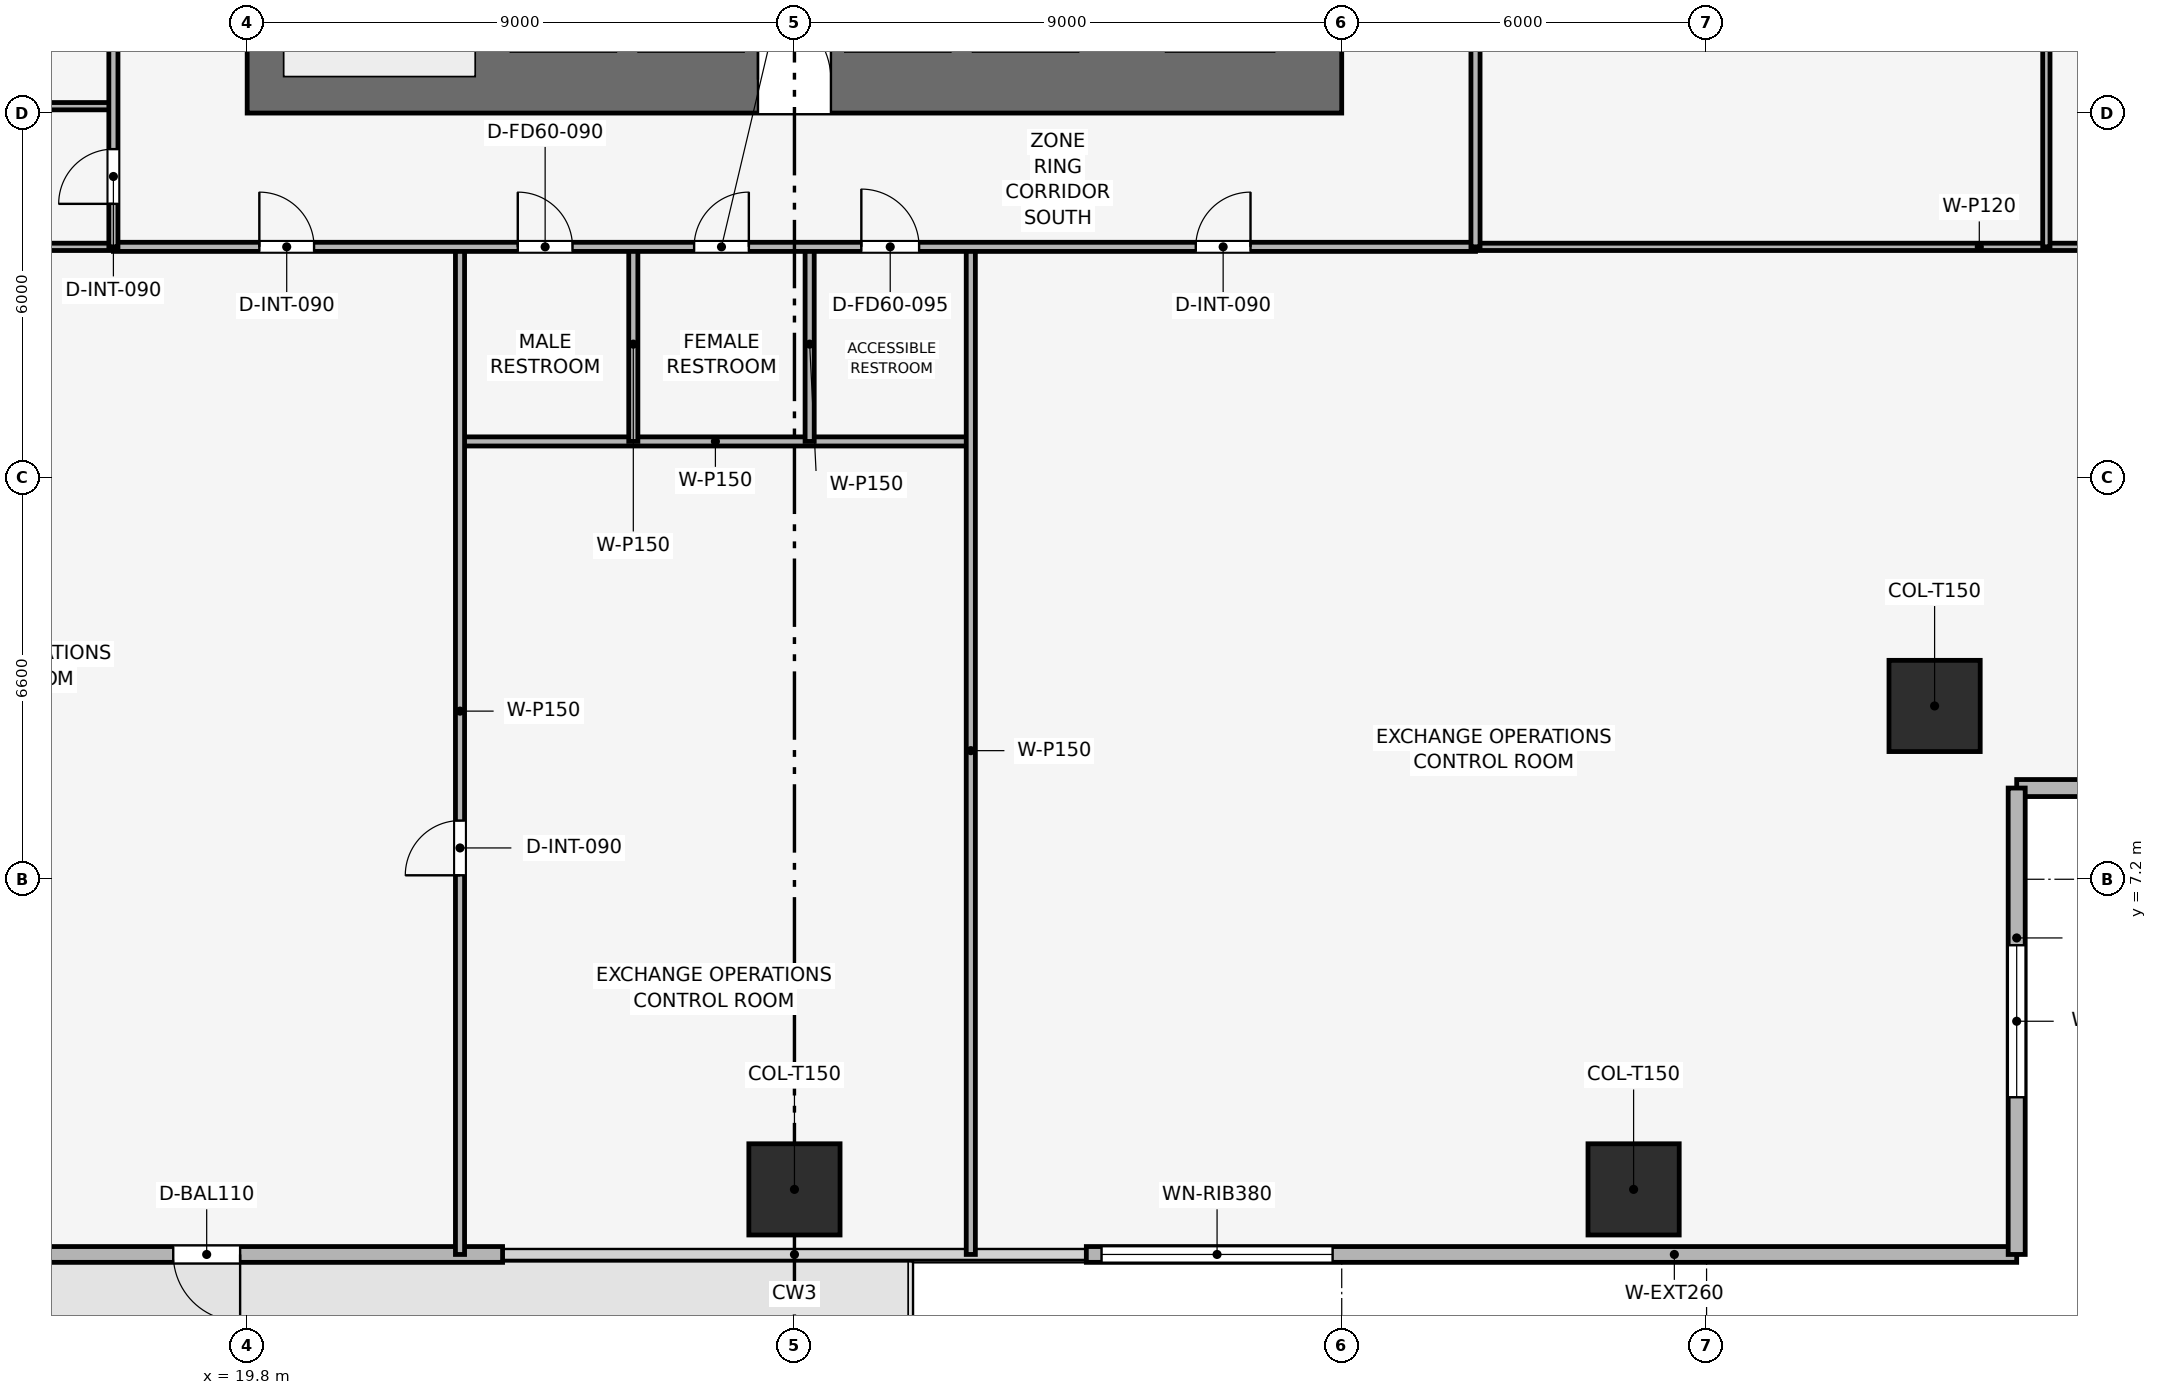
"""IFC4 building model, lengths in metres.
Left out: names, types, materials, properties, quantities, classifications, styles, units other than length and angle.
Written with IfcOpenShell. Run it as: python <this file> out.ifc"""

import sys

from ifc_helpers import new_model, si_unit, direction, frame, frame_2d, origin, origin_2d, place, context, subcontext, project, spatial, rectangle, extrude, element, fill, save


model = new_model("IFC4")
c1 = context("Model", 3, precision=1e-05, world=origin(), true_north=direction((0.0, 1.0)))
c2 = subcontext(c1, "Body", "Model", "MODEL_VIEW")
j1 = project(units=[si_unit("LENGTHUNIT", "METRE"), si_unit("PLANEANGLEUNIT", "RADIAN")], contexts=[c1])
p1 = place(None, origin())
s1 = spatial("IfcSite", under=j1, at=p1, CompositionType="ELEMENT")
p2 = place(p1, origin())
s2 = spatial("IfcBuilding", under=s1, at=p2, CompositionType="ELEMENT")
p3 = place(p2, frame((0.0, 0.0, 53.4)))
s3 = spatial("IfcBuildingStorey", under=s2, at=p3, CompositionType="ELEMENT", Elevation=53.4)
p4 = place(p3, frame((19.8, 20.35, 0.0), z_axis=(0.0, 0.0, 1.0), x_axis=(1.0, 0.0, 0.0)))
e1 = element("IfcWall", 1, at=p4, inside=s3, PredefinedType="SHEAR", context=c2, shape_type="SweptSolid", body=[
    extrude(rectangle(XDim=18.0, YDim=1.1, at=frame_2d((9.0, 0.0))), origin(), (0.0, 0.0, 1.0), 3.9),
])
p5 = place(p4, frame((8.4, 0.0, 0.0)))
e2 = element("IfcOpeningElement", 2, at=p5, cuts=e1, PredefinedType="OPENING", context=c2, shape_type="SweptSolid", body=[
    extrude(rectangle(XDim=1.2, YDim=2.2, at=frame_2d((0.6, 1.1))), frame((0.0, 0.56, 0.0), z_axis=(0.0, -1.0, 0.0), x_axis=(1.0, 0.0, 0.0)), (0.0, 0.0, 1.0), 1.12),
])
for number, where, z_axis, x_axis in (
    (3, (28.8, 2.1, 0.003), (0.0, 0.0, 1.0), (1.0, 0.0, 0.0)),
    (4, (42.6, 2.1, 0.003), (0.0, 0.0, 1.0), (1.0, 0.0, 0.0)),
    (5, (47.55, 10.05, 0.003), (0.0, 0.0, 1.0), (1.0, 0.0, 0.0)),
):
    element("IfcColumn", number, at=place(p3, frame(where, z_axis=z_axis, x_axis=x_axis)), inside=s3, PredefinedType="COLUMN", context=c2, shape_type="SweptSolid", body=[
        extrude(rectangle(XDim=1.5, YDim=1.5, at=origin_2d()), origin(), (0.0, 0.0, 1.0), 3.644),
    ])
p6 = place(p3, frame((48.9, 1.03, 0.0), z_axis=(0.0, 0.0, 1.0), x_axis=(-1.0, 0.0, 0.0)))
e6 = element("IfcWall", 6, at=p6, inside=s3, PredefinedType="SOLIDWALL", context=c2, shape_type="SweptSolid", body=[
    extrude(rectangle(XDim=15.3, YDim=0.26, at=frame_2d((7.65, 0.0))), origin(), (0.0, 0.0, 1.0), 3.65),
])
p7 = place(p6, frame((11.25, 0.0, 0.9)))
e7 = element("IfcOpeningElement", 7, at=p7, cuts=e6, PredefinedType="OPENING", context=c2, shape_type="SweptSolid", body=[
    extrude(rectangle(XDim=3.8, YDim=1.9, at=frame_2d((1.9, 0.95))), frame((0.0, 0.14, 0.0), z_axis=(0.0, -1.0, 0.0), x_axis=(1.0, 0.0, 0.0)), (0.0, 0.0, 1.0), 0.28),
])
p8 = place(p3, frame((24.0, 1.03, 0.0), z_axis=(0.0, 0.0, 1.0), x_axis=(-1.0, 0.0, 0.0)))
e8 = element("IfcWall", 8, at=p8, inside=s3, PredefinedType="SOLIDWALL", context=c2, shape_type="SweptSolid", body=[
    extrude(rectangle(XDim=15.3, YDim=0.26, at=frame_2d((7.65, 0.0))), origin(), (0.0, 0.0, 1.0), 3.65),
])
p9 = place(p8, frame((4.316, 0.0, 0.0)))
e9 = element("IfcOpeningElement", 9, at=p9, cuts=e8, PredefinedType="OPENING", context=c2, shape_type="SweptSolid", body=[
    extrude(rectangle(XDim=1.1, YDim=2.2, at=frame_2d((0.55, 1.1))), frame((0.0, 0.14, 0.0), z_axis=(0.0, -1.0, 0.0), x_axis=(1.0, 0.0, 0.0)), (0.0, 0.0, 1.0), 0.28),
])
p10 = place(p3, frame((56.57, 8.7, 0.0), z_axis=(0.0, 0.0, 1.0), x_axis=(-1.0, 0.0, 0.0)))
e10 = element("IfcWall", 10, at=p10, inside=s3, PredefinedType="SOLIDWALL", context=c2, shape_type="SweptSolid", body=[
    extrude(rectangle(XDim=7.67, YDim=0.28, at=frame_2d((3.835, 0.0))), origin(), (0.0, 0.0, 1.0), 3.65),
])
p11 = place(p10, frame((2.585, 0.0, 0.9)))
e11 = element("IfcOpeningElement", 11, at=p11, cuts=e10, PredefinedType="OPENING", context=c2, shape_type="SweptSolid", body=[
    extrude(rectangle(XDim=2.5, YDim=1.9, at=frame_2d((1.25, 0.95))), frame((0.0, 0.15, 0.0), z_axis=(0.0, -1.0, 0.0), x_axis=(1.0, 0.0, 0.0)), (0.0, 0.0, 1.0), 0.3),
])
p12 = place(p3, frame((48.9, 8.7, 0.0), z_axis=(0.0, 0.0, 1.0), x_axis=(0.0, -1.0, 0.0)))
e12 = element("IfcWall", 12, at=p12, inside=s3, PredefinedType="SOLIDWALL", context=c2, shape_type="SweptSolid", body=[
    extrude(rectangle(XDim=7.67, YDim=0.28, at=frame_2d((3.835, 0.0))), origin(), (0.0, 0.0, 1.0), 3.65),
])
p13 = place(p12, frame((2.585, 0.0, 0.9)))
e13 = element("IfcOpeningElement", 13, at=p13, cuts=e12, PredefinedType="OPENING", context=c2, shape_type="SweptSolid", body=[
    extrude(rectangle(XDim=2.5, YDim=1.9, at=frame_2d((1.25, 0.95))), frame((0.0, 0.15, 0.0), z_axis=(0.0, -1.0, 0.0), x_axis=(1.0, 0.0, 0.0)), (0.0, 0.0, 1.0), 0.3),
])
p14 = place(p3, frame((23.3, 14.4, 0.0), z_axis=(0.0, 0.0, 1.0), x_axis=(1.0, 0.0, 0.0)))
e14 = element("IfcWall", 14, at=p14, inside=s3, PredefinedType="PARTITIONING", context=c2, shape_type="SweptSolid", body=[
    extrude(rectangle(XDim=8.4, YDim=0.15, at=frame_2d((4.2, 0.0))), origin(), (0.0, 0.0, 1.0), 3.085),
])
p15 = place(p3, frame((23.3, 1.03, 0.0), z_axis=(0.0, 0.0, 1.0), x_axis=(0.0, 1.0, 0.0)))
e15 = element("IfcWall", 15, at=p15, inside=s3, PredefinedType="PARTITIONING", context=c2, shape_type="SweptSolid", body=[
    extrude(rectangle(XDim=16.57, YDim=0.15, at=frame_2d((8.285, 0.0))), origin(), (0.0, 0.0, 1.0), 2.935),
])
p16 = place(p15, frame((6.235, 0.0, 0.0)))
e16 = element("IfcOpeningElement", 16, at=p16, cuts=e15, PredefinedType="OPENING", context=c2, shape_type="SweptSolid", body=[
    extrude(rectangle(XDim=0.9, YDim=2.1, at=frame_2d((0.45, 1.05))), frame((0.0, 0.085, 0.0), z_axis=(0.0, -1.0, 0.0), x_axis=(1.0, 0.0, 0.0)), (0.0, 0.0, 1.0), 0.17),
])
p17 = place(p3, frame((31.7, 1.03, 0.0), z_axis=(0.0, 0.0, 1.0), x_axis=(0.0, 1.0, 0.0)))
e17 = element("IfcWall", 17, at=p17, inside=s3, PredefinedType="PARTITIONING", context=c2, shape_type="SweptSolid", body=[
    extrude(rectangle(XDim=16.57, YDim=0.15, at=frame_2d((8.285, 0.0))), origin(), (0.0, 0.0, 1.0), 2.935),
])
for number, where, z_axis, x_axis in (
    (18, (26.15, 14.4, 0.0), (0.0, 0.0, 1.0), (0.0, 1.0, 0.0)),
    (19, (29.05, 14.4, 0.0), (0.0, 0.0, 1.0), (0.0, 1.0, 0.0)),
):
    element("IfcWall", number, at=place(p3, frame(where, z_axis=z_axis, x_axis=x_axis)), inside=s3, PredefinedType="PARTITIONING", context=c2, shape_type="SweptSolid", body=[
        extrude(rectangle(XDim=3.2, YDim=0.15, at=frame_2d((1.6, 0.0))), origin(), (0.0, 0.0, 1.0), 3.65),
    ])
for number, where, z_axis, x_axis in (
    (20, (1.03, 17.6, 0.0), (0.0, 0.0, 1.0), (1.0, 0.0, 0.0)),
    (21, (40.0, 17.6, 0.0), (0.0, 0.0, 1.0), (1.0, 0.0, 0.0)),
    (22, (1.03, 19.913, 0.0), (0.0, 0.0, 1.0), (1.0, 0.0, 0.0)),
):
    element("IfcWall", number, at=place(p3, frame(where, z_axis=z_axis, x_axis=x_axis)), inside=s3, PredefinedType="PARTITIONING", context=c2, shape_type="SweptSolid", body=[
        extrude(rectangle(XDim=16.57, YDim=0.12, at=frame_2d((8.285, 0.0))), origin(), (0.0, 0.0, 1.0), 2.935),
    ])
p18 = place(p3, frame((49.388, 17.6, 0.0), z_axis=(0.0, 0.0, 1.0), x_axis=(0.0, 1.0, 0.0)))
e23 = element("IfcWall", 23, at=p18, inside=s3, PredefinedType="PARTITIONING", context=c2, shape_type="SweptSolid", body=[
    extrude(rectangle(XDim=22.4, YDim=0.12, at=frame_2d((11.2, 0.0))), origin(), (0.0, 0.0, 1.0), 3.085),
])
p19 = place(p18, frame((17.783, 0.0, 0.0)))
e24 = element("IfcOpeningElement", 24, at=p19, cuts=e23, PredefinedType="OPENING", context=c2, shape_type="SweptSolid", body=[
    extrude(rectangle(XDim=0.9, YDim=2.1, at=frame_2d((0.45, 1.05))), frame((0.0, 0.07, 0.0), z_axis=(0.0, -1.0, 0.0), x_axis=(1.0, 0.0, 0.0)), (0.0, 0.0, 1.0), 0.14),
])
p20 = place(p3, frame((17.6, 17.6, 0.0), z_axis=(0.0, 0.0, 1.0), x_axis=(1.0, 0.0, 0.0)))
e25 = element("IfcWall", 25, at=p20, inside=s3, PredefinedType="PARTITIONING", context=c2, shape_type="SweptSolid", body=[
    extrude(rectangle(XDim=22.4, YDim=0.15, at=frame_2d((11.2, 0.0))), origin(), (0.0, 0.0, 1.0), 3.085),
])
p21 = place(p20, frame((2.4, 0.0, 0.0)))
e26 = element("IfcOpeningElement", 26, at=p21, cuts=e25, PredefinedType="OPENING", context=c2, shape_type="SweptSolid", body=[
    extrude(rectangle(XDim=0.9, YDim=2.1, at=frame_2d((0.45, 1.05))), frame((0.0, 0.085, 0.0), z_axis=(0.0, -1.0, 0.0), x_axis=(1.0, 0.0, 0.0)), (0.0, 0.0, 1.0), 0.17),
])
p22 = place(p20, frame((6.65, 0.0, 0.0)))
e27 = element("IfcOpeningElement", 27, at=p22, cuts=e25, PredefinedType="OPENING", context=c2, shape_type="SweptSolid", body=[
    extrude(rectangle(XDim=0.9, YDim=2.1, at=frame_2d((0.45, 1.05))), frame((0.0, 0.085, 0.0), z_axis=(0.0, -1.0, 0.0), x_axis=(1.0, 0.0, 0.0)), (0.0, 0.0, 1.0), 0.17),
])
p23 = place(p20, frame((9.55, 0.0, 0.0)))
e28 = element("IfcOpeningElement", 28, at=p23, cuts=e25, PredefinedType="OPENING", context=c2, shape_type="SweptSolid", body=[
    extrude(rectangle(XDim=0.9, YDim=2.1, at=frame_2d((0.45, 1.05))), frame((0.0, 0.085, 0.0), z_axis=(0.0, -1.0, 0.0), x_axis=(1.0, 0.0, 0.0)), (0.0, 0.0, 1.0), 0.17),
])
p24 = place(p20, frame((12.3, 0.0, 0.0)))
e29 = element("IfcOpeningElement", 29, at=p24, cuts=e25, PredefinedType="OPENING", context=c2, shape_type="SweptSolid", body=[
    extrude(rectangle(XDim=0.95, YDim=2.1, at=frame_2d((0.475, 1.05))), frame((0.0, 0.085, 0.0), z_axis=(0.0, -1.0, 0.0), x_axis=(1.0, 0.0, 0.0)), (0.0, 0.0, 1.0), 0.17),
])
p25 = place(p20, frame((17.8, 0.0, 0.0)))
e30 = element("IfcOpeningElement", 30, at=p25, cuts=e25, PredefinedType="OPENING", context=c2, shape_type="SweptSolid", body=[
    extrude(rectangle(XDim=0.9, YDim=2.1, at=frame_2d((0.45, 1.05))), frame((0.0, 0.085, 0.0), z_axis=(0.0, -1.0, 0.0), x_axis=(1.0, 0.0, 0.0)), (0.0, 0.0, 1.0), 0.17),
])
p26 = place(p3, frame((17.6, 17.6, 0.0), z_axis=(0.0, 0.0, 1.0), x_axis=(0.0, 1.0, 0.0)))
e31 = element("IfcWall", 31, at=p26, inside=s3, PredefinedType="PARTITIONING", context=c2, shape_type="SweptSolid", body=[
    extrude(rectangle(XDim=22.4, YDim=0.15, at=frame_2d((11.2, 0.0))), origin(), (0.0, 0.0, 1.0), 3.085),
])
p27 = place(p26, frame((0.707, 0.0, 0.0)))
e32 = element("IfcOpeningElement", 32, at=p27, cuts=e31, PredefinedType="OPENING", context=c2, shape_type="SweptSolid", body=[
    extrude(rectangle(XDim=0.9, YDim=2.1, at=frame_2d((0.45, 1.05))), frame((0.0, 0.085, 0.0), z_axis=(0.0, -1.0, 0.0), x_axis=(1.0, 0.0, 0.0)), (0.0, 0.0, 1.0), 0.17),
])
p28 = place(p26, frame((4.745, 0.0, 0.0)))
e33 = element("IfcOpeningElement", 33, at=p28, cuts=e31, PredefinedType="OPENING", context=c2, shape_type="SweptSolid", body=[
    extrude(rectangle(XDim=0.9, YDim=2.1, at=frame_2d((0.45, 1.05))), frame((0.0, 0.085, 0.0), z_axis=(0.0, -1.0, 0.0), x_axis=(1.0, 0.0, 0.0)), (0.0, 0.0, 1.0), 0.17),
])
p29 = place(p26, frame((10.769, 0.0, 0.0)))
e34 = element("IfcOpeningElement", 34, at=p29, cuts=e31, PredefinedType="OPENING", context=c2, shape_type="SweptSolid", body=[
    extrude(rectangle(XDim=0.9, YDim=2.1, at=frame_2d((0.45, 1.05))), frame((0.0, 0.085, 0.0), z_axis=(0.0, -1.0, 0.0), x_axis=(1.0, 0.0, 0.0)), (0.0, 0.0, 1.0), 0.17),
])
p30 = place(p26, frame((17.931, 0.0, 0.0)))
e35 = element("IfcOpeningElement", 35, at=p30, cuts=e31, PredefinedType="OPENING", context=c2, shape_type="SweptSolid", body=[
    extrude(rectangle(XDim=0.9, YDim=2.1, at=frame_2d((0.45, 1.05))), frame((0.0, 0.085, 0.0), z_axis=(0.0, -1.0, 0.0), x_axis=(1.0, 0.0, 0.0)), (0.0, 0.0, 1.0), 0.17),
])
p31 = place(p3, frame((40.0, 17.6, 0.0), z_axis=(0.0, 0.0, 1.0), x_axis=(0.0, 1.0, 0.0)))
e36 = element("IfcWall", 36, at=p31, inside=s3, PredefinedType="PARTITIONING", context=c2, shape_type="SweptSolid", body=[
    extrude(rectangle(XDim=22.4, YDim=0.15, at=frame_2d((11.2, 0.0))), origin(), (0.0, 0.0, 1.0), 3.085),
])
p32 = place(p31, frame((10.75, 0.0, 0.0)))
e37 = element("IfcOpeningElement", 37, at=p32, cuts=e36, PredefinedType="OPENING", context=c2, shape_type="SweptSolid", body=[
    extrude(rectangle(XDim=0.9, YDim=2.1, at=frame_2d((0.45, 1.05))), frame((0.0, 0.085, 0.0), z_axis=(0.0, -1.0, 0.0), x_axis=(1.0, 0.0, 0.0)), (0.0, 0.0, 1.0), 0.17),
])
p33 = place(p9, origin())
e38 = element("IfcDoor", 38, at=p33, inside=s3, OperationType="SINGLE_SWING_LEFT", PredefinedType="DOOR", context=c2, shape_type="SweptSolid", body=[
    extrude(rectangle(XDim=1.1, YDim=2.2, at=frame_2d((0.55, 1.1))), frame((0.0, 0.025, 0.0), z_axis=(0.0, -1.0, 0.0), x_axis=(1.0, 0.0, 0.0)), (0.0, 0.0, 1.0), 0.05),
])
fill(e9, e38)
p34 = place(p7, origin())
e39 = element("IfcWindow", 39, at=p34, inside=s3, PartitioningType="SINGLE_PANEL", PredefinedType="WINDOW", context=c2, shape_type="SweptSolid", body=[
    extrude(rectangle(XDim=3.8, YDim=1.9, at=frame_2d((1.9, 0.95))), frame((0.0, 0.03, 0.0), z_axis=(0.0, -1.0, 0.0), x_axis=(1.0, 0.0, 0.0)), (0.0, 0.0, 1.0), 0.06),
])
fill(e7, e39)
p35 = place(p13, origin())
e40 = element("IfcWindow", 40, at=p35, inside=s3, PartitioningType="SINGLE_PANEL", PredefinedType="WINDOW", context=c2, shape_type="SweptSolid", body=[
    extrude(rectangle(XDim=2.5, YDim=1.9, at=frame_2d((1.25, 0.95))), frame((0.0, 0.03, 0.0), z_axis=(0.0, -1.0, 0.0), x_axis=(1.0, 0.0, 0.0)), (0.0, 0.0, 1.0), 0.06),
])
fill(e13, e40)
p36 = place(p16, origin())
e41 = element("IfcDoor", 41, at=p36, inside=s3, OperationType="SINGLE_SWING_LEFT", PredefinedType="DOOR", context=c2, shape_type="SweptSolid", body=[
    extrude(rectangle(XDim=0.9, YDim=2.1, at=frame_2d((0.45, 1.05))), frame((0.0, 0.025, 0.0), z_axis=(0.0, -1.0, 0.0), x_axis=(1.0, 0.0, 0.0)), (0.0, 0.0, 1.0), 0.05),
])
fill(e16, e41)
p37 = place(p21, origin())
e42 = element("IfcDoor", 42, at=p37, inside=s3, OperationType="SINGLE_SWING_LEFT", PredefinedType="DOOR", context=c2, shape_type="SweptSolid", body=[
    extrude(rectangle(XDim=0.9, YDim=2.1, at=frame_2d((0.45, 1.05))), frame((0.0, 0.025, 0.0), z_axis=(0.0, -1.0, 0.0), x_axis=(1.0, 0.0, 0.0)), (0.0, 0.0, 1.0), 0.05),
])
fill(e26, e42)
p38 = place(p22, origin())
e43 = element("IfcDoor", 43, at=p38, inside=s3, OperationType="SINGLE_SWING_LEFT", PredefinedType="DOOR", context=c2, shape_type="SweptSolid", body=[
    extrude(rectangle(XDim=0.9, YDim=2.1, at=frame_2d((0.45, 1.05))), frame((0.0, 0.025, 0.0), z_axis=(0.0, -1.0, 0.0), x_axis=(1.0, 0.0, 0.0)), (0.0, 0.0, 1.0), 0.05),
])
fill(e27, e43)
p39 = place(p23, origin())
e44 = element("IfcDoor", 44, at=p39, inside=s3, OperationType="SINGLE_SWING_RIGHT", PredefinedType="DOOR", context=c2, shape_type="SweptSolid", body=[
    extrude(rectangle(XDim=0.9, YDim=2.1, at=frame_2d((0.45, 1.05))), frame((0.0, 0.025, 0.0), z_axis=(0.0, -1.0, 0.0), x_axis=(1.0, 0.0, 0.0)), (0.0, 0.0, 1.0), 0.05),
])
fill(e28, e44)
p40 = place(p24, origin())
e45 = element("IfcDoor", 45, at=p40, inside=s3, OperationType="SINGLE_SWING_LEFT", PredefinedType="DOOR", context=c2, shape_type="SweptSolid", body=[
    extrude(rectangle(XDim=0.95, YDim=2.1, at=frame_2d((0.475, 1.05))), frame((0.0, 0.025, 0.0), z_axis=(0.0, -1.0, 0.0), x_axis=(1.0, 0.0, 0.0)), (0.0, 0.0, 1.0), 0.05),
])
fill(e29, e45)
p41 = place(p25, origin())
e46 = element("IfcDoor", 46, at=p41, inside=s3, OperationType="SINGLE_SWING_RIGHT", PredefinedType="DOOR", context=c2, shape_type="SweptSolid", body=[
    extrude(rectangle(XDim=0.9, YDim=2.1, at=frame_2d((0.45, 1.05))), frame((0.0, 0.025, 0.0), z_axis=(0.0, -1.0, 0.0), x_axis=(1.0, 0.0, 0.0)), (0.0, 0.0, 1.0), 0.05),
])
fill(e30, e46)
p42 = place(p27, origin())
e47 = element("IfcDoor", 47, at=p42, inside=s3, OperationType="SINGLE_SWING_LEFT", PredefinedType="DOOR", context=c2, shape_type="SweptSolid", body=[
    extrude(rectangle(XDim=0.9, YDim=2.1, at=frame_2d((0.45, 1.05))), frame((0.0, 0.025, 0.0), z_axis=(0.0, -1.0, 0.0), x_axis=(1.0, 0.0, 0.0)), (0.0, 0.0, 1.0), 0.05),
])
fill(e32, e47)
p43 = place(p5, origin())
e48 = element("IfcDoor", 48, at=p43, inside=s3, OperationType="SINGLE_SWING_LEFT", PredefinedType="DOOR", context=c2, shape_type="SweptSolid", body=[
    extrude(rectangle(XDim=1.2, YDim=2.2, at=frame_2d((0.6, 1.1))), frame((0.0, 0.025, 0.0), z_axis=(0.0, -1.0, 0.0), x_axis=(1.0, 0.0, 0.0)), (0.0, 0.0, 1.0), 0.05),
])
fill(e2, e48)
save(model, sys.argv[1])
